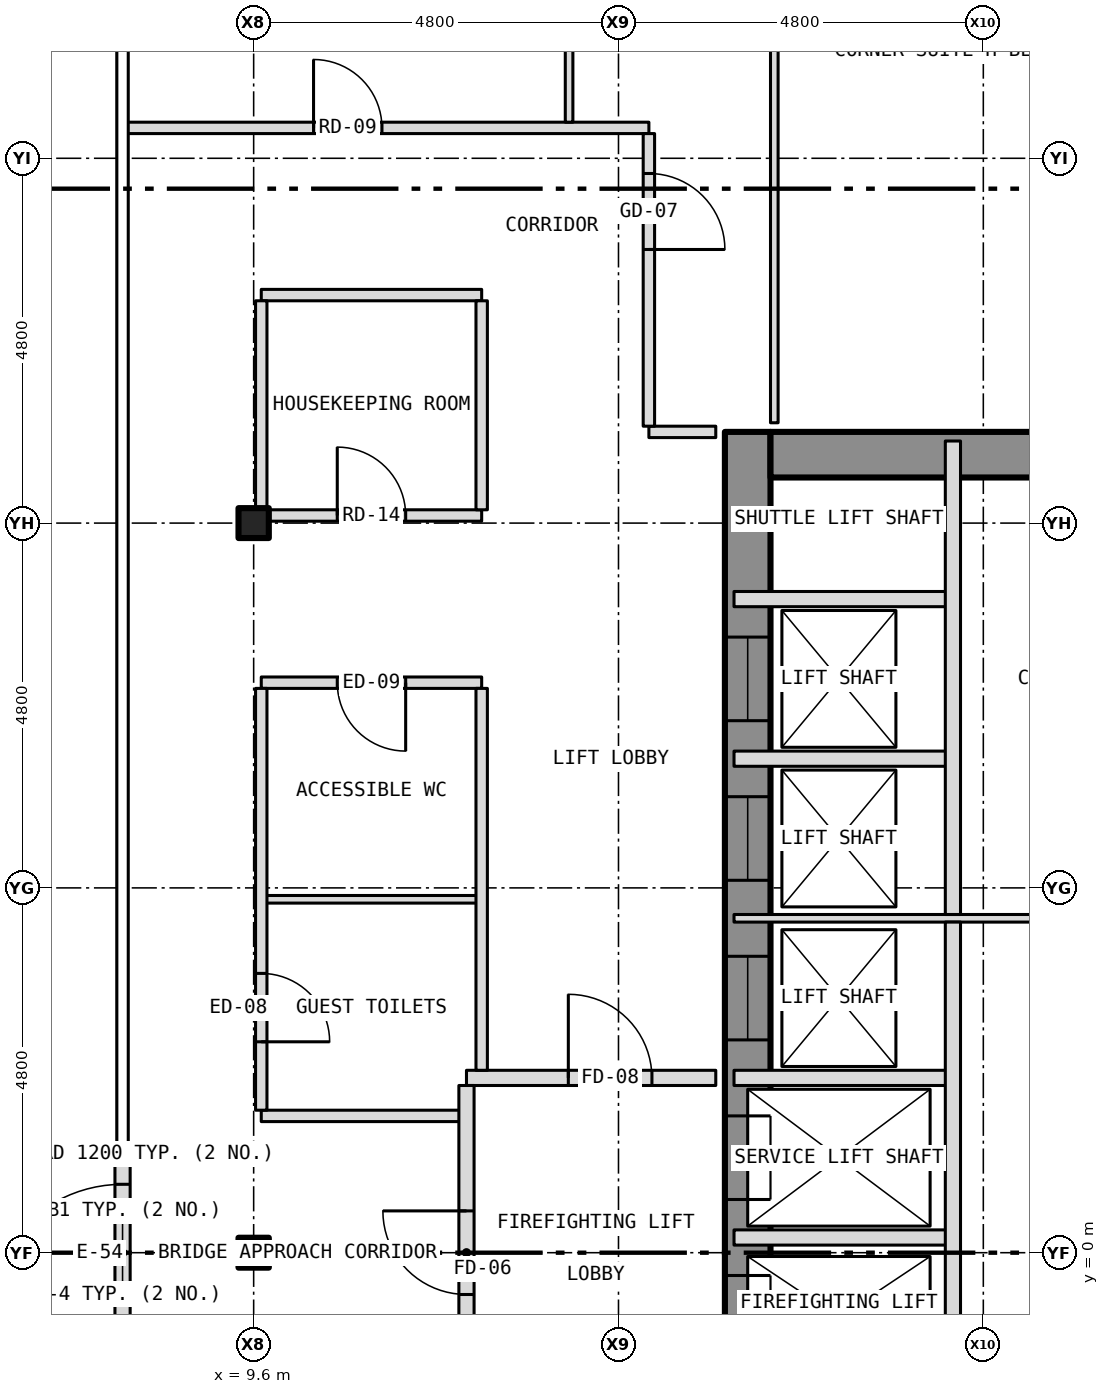
"""IFC4 building model, lengths in metres.
Left out: names, types, materials, properties, quantities, classifications, styles, units other than length and angle.
Written with IfcOpenShell. Run it as: python <this file> out.ifc"""

import sys

from ifc_helpers import new_model, si_unit, direction, frame, frame_2d, origin, origin_2d, place, context, subcontext, project, spatial, rectangle, i_section, extrude, element, fill, save


model = new_model("IFC4")
c1 = context("Model", 3, precision=1e-05, world=origin(), true_north=direction((0.0, 1.0)))
c2 = subcontext(c1, "Body", "Model", "MODEL_VIEW")
j1 = project(units=[si_unit("LENGTHUNIT", "METRE"), si_unit("PLANEANGLEUNIT", "RADIAN")], contexts=[c1])
p1 = place(None, origin())
s1 = spatial("IfcSite", under=j1, at=p1, CompositionType="ELEMENT")
p2 = place(p1, origin())
s2 = spatial("IfcBuilding", under=s1, at=p2, CompositionType="ELEMENT")
p3 = place(p2, frame((0.0, 0.0, 134.5)))
s3 = spatial("IfcBuildingStorey", under=s2, at=p3, CompositionType="ELEMENT", Elevation=134.5)
for number, where, z_axis, x_axis in (
    (1, (9.6, 0.0, -0.15), (0.0, 0.0, 1.0), (1.0, 0.0, 0.0)),
    (2, (9.6, 9.6, -0.15), (0.0, 0.0, 1.0), (1.0, 0.0, 0.0)),
):
    element("IfcColumn", number, at=place(p3, frame(where, z_axis=z_axis, x_axis=x_axis)), inside=s3, PredefinedType="COLUMN", context=c2, shape_type="SweptSolid", body=[
        extrude(i_section(OverallWidth=0.399, OverallDepth=0.394, WebThickness=0.023, FlangeThickness=0.037, at=origin_2d()), origin(), (0.0, 0.0, 1.0), 3.35),
    ])
p4 = place(p3, frame((16.1, -10.8, 0.0), z_axis=(0.0, 0.0, 1.0), x_axis=(0.0, 1.0, 0.0)))
e3 = element("IfcWall", 3, at=p4, inside=s3, PredefinedType="SHEAR", context=c2, shape_type="SweptSolid", body=[
    extrude(rectangle(XDim=21.6, YDim=0.6, at=frame_2d((10.8, 0.0))), origin(), (0.0, 0.0, 1.0), 2.9),
])
p5 = place(p4, frame((9.4, 0.0, 0.0)))
e4 = element("IfcOpeningElement", 4, at=p5, cuts=e3, PredefinedType="OPENING", context=c2, shape_type="SweptSolid", body=[
    extrude(rectangle(XDim=1.1, YDim=2.1, at=frame_2d((0.55, 1.05))), frame((0.0, 0.312, 0.0), z_axis=(0.0, -1.0, 0.0), x_axis=(1.0, 0.0, 0.0)), (0.0, 0.0, 1.0), 0.624),
])
p6 = place(p4, frame((11.5, 0.0, 0.0)))
e5 = element("IfcOpeningElement", 5, at=p6, cuts=e3, PredefinedType="OPENING", context=c2, shape_type="SweptSolid", body=[
    extrude(rectangle(XDim=1.1, YDim=2.1, at=frame_2d((0.55, 1.05))), frame((0.0, 0.312, 0.0), z_axis=(0.0, -1.0, 0.0), x_axis=(1.0, 0.0, 0.0)), (0.0, 0.0, 1.0), 0.624),
])
p7 = place(p4, frame((13.6, 0.0, 0.0)))
e6 = element("IfcOpeningElement", 6, at=p7, cuts=e3, PredefinedType="OPENING", context=c2, shape_type="SweptSolid", body=[
    extrude(rectangle(XDim=1.1, YDim=2.1, at=frame_2d((0.55, 1.05))), frame((0.0, 0.312, 0.0), z_axis=(0.0, -1.0, 0.0), x_axis=(1.0, 0.0, 0.0)), (0.0, 0.0, 1.0), 0.624),
])
p8 = place(p4, frame((15.7, 0.0, 0.0)))
e7 = element("IfcOpeningElement", 7, at=p8, cuts=e3, PredefinedType="OPENING", context=c2, shape_type="SweptSolid", body=[
    extrude(rectangle(XDim=1.1, YDim=2.1, at=frame_2d((0.55, 1.05))), frame((0.0, 0.312, 0.0), z_axis=(0.0, -1.0, 0.0), x_axis=(1.0, 0.0, 0.0)), (0.0, 0.0, 1.0), 0.624),
])
p9 = place(p4, frame((17.8, 0.0, 0.0)))
e8 = element("IfcOpeningElement", 8, at=p9, cuts=e3, PredefinedType="OPENING", context=c2, shape_type="SweptSolid", body=[
    extrude(rectangle(XDim=1.1, YDim=2.1, at=frame_2d((0.55, 1.05))), frame((0.0, 0.312, 0.0), z_axis=(0.0, -1.0, 0.0), x_axis=(1.0, 0.0, 0.0)), (0.0, 0.0, 1.0), 0.624),
])
p10 = place(p4, frame((5.642, 0.0, 0.0)))
e9 = element("IfcOpeningElement", 9, at=p10, cuts=e3, PredefinedType="OPENING", context=c2, shape_type="SweptSolid", body=[
    extrude(rectangle(XDim=1.1, YDim=2.1, at=frame_2d((0.55, 1.05))), frame((0.0, 0.312, 0.0), z_axis=(0.0, -1.0, 0.0), x_axis=(1.0, 0.0, 0.0)), (0.0, 0.0, 1.0), 0.624),
])
p11 = place(p4, frame((7.5, 0.0, 0.0)))
e10 = element("IfcOpeningElement", 10, at=p11, cuts=e3, PredefinedType="OPENING", context=c2, shape_type="SweptSolid", body=[
    extrude(rectangle(XDim=1.1, YDim=2.1, at=frame_2d((0.55, 1.05))), frame((0.0, 0.312, 0.0), z_axis=(0.0, -1.0, 0.0), x_axis=(1.0, 0.0, 0.0)), (0.0, 0.0, 1.0), 0.624),
])
p12 = place(p3, frame((16.4, 10.5, 0.0), z_axis=(0.0, 0.0, 1.0), x_axis=(1.0, 0.0, 0.0)))
e11 = element("IfcWall", 11, at=p12, inside=s3, PredefinedType="SHEAR", context=c2, shape_type="SweptSolid", body=[
    extrude(rectangle(XDim=5.8, YDim=0.6, at=frame_2d((2.9, 0.0))), origin(), (0.0, 0.0, 1.0), 2.9),
])
p13 = place(p3, frame((7.875, -1.4, 0.0), z_axis=(0.0, 0.0, 1.0), x_axis=(0.0, 1.0, 0.0)))
e12 = element("IfcWall", 12, at=p13, inside=s3, PredefinedType="SOLIDWALL", context=c2, shape_type="SweptSolid", body=[
    extrude(rectangle(XDim=2.8, YDim=0.2, at=frame_2d((1.4, 0.0))), origin(), (0.0, 0.0, 1.0), 3.5),
])
p14 = place(p13, frame((0.5, 0.0, 0.0)))
e13 = element("IfcOpeningElement", 13, at=p14, cuts=e12, PredefinedType="OPENING", context=c2, shape_type="SweptSolid", body=[
    extrude(rectangle(XDim=1.8, YDim=2.1, at=frame_2d((0.9, 1.05))), frame((0.0, 0.112, 0.0), z_axis=(0.0, -1.0, 0.0), x_axis=(1.0, 0.0, 0.0)), (0.0, 0.0, 1.0), 0.224),
])
p15 = place(p3, frame((15.92, 0.2, 0.0), z_axis=(0.0, 0.0, 1.0), x_axis=(1.0, 0.0, 0.0)))
e14 = element("IfcWall", 14, at=p15, inside=s3, PredefinedType="PARTITIONING", context=c2, shape_type="SweptSolid", body=[
    extrude(rectangle(XDim=2.88, YDim=0.2, at=frame_2d((1.44, 0.0))), origin(), (0.0, 0.0, 1.0), 2.9),
])
p16 = place(p3, frame((9.7, 1.8, 0.0), z_axis=(0.0, 0.0, 1.0), x_axis=(1.0, 0.0, 0.0)))
e15 = element("IfcWall", 15, at=p16, inside=s3, PredefinedType="PARTITIONING", context=c2, shape_type="SweptSolid", body=[
    extrude(rectangle(XDim=2.7, YDim=0.15, at=frame_2d((1.35, 0.0))), origin(), (0.0, 0.0, 1.0), 3.2),
])
p17 = place(p3, frame((12.4, 2.3, 0.0), z_axis=(0.0, 0.0, 1.0), x_axis=(1.0, 0.0, 0.0)))
e16 = element("IfcWall", 16, at=p17, inside=s3, PredefinedType="PARTITIONING", context=c2, shape_type="SweptSolid", body=[
    extrude(rectangle(XDim=3.28, YDim=0.2, at=frame_2d((1.64, 0.0))), origin(), (0.0, 0.0, 1.0), 3.2),
])
p18 = place(p17, frame((1.34, 0.0, 0.0)))
e17 = element("IfcOpeningElement", 17, at=p18, cuts=e16, PredefinedType="OPENING", context=c2, shape_type="SweptSolid", body=[
    extrude(rectangle(XDim=1.1, YDim=2.1, at=frame_2d((0.55, 1.05))), frame((0.0, 0.112, 0.0), z_axis=(0.0, -1.0, 0.0), x_axis=(1.0, 0.0, 0.0)), (0.0, 0.0, 1.0), 0.224),
])
p19 = place(p3, frame((15.92, 2.3, 0.0), z_axis=(0.0, 0.0, 1.0), x_axis=(1.0, 0.0, 0.0)))
e18 = element("IfcWall", 18, at=p19, inside=s3, PredefinedType="PARTITIONING", context=c2, shape_type="SweptSolid", body=[
    extrude(rectangle(XDim=2.88, YDim=0.2, at=frame_2d((1.44, 0.0))), origin(), (0.0, 0.0, 1.0), 2.9),
])
p20 = place(p3, frame((15.92, 4.4, 0.0), z_axis=(0.0, 0.0, 1.0), x_axis=(1.0, 0.0, 0.0)))
e19 = element("IfcWall", 19, at=p20, inside=s3, PredefinedType="PARTITIONING", context=c2, shape_type="SweptSolid", body=[
    extrude(rectangle(XDim=6.76, YDim=0.1, at=frame_2d((3.38, 0.0))), origin(), (0.0, 0.0, 1.0), 2.9),
])
p21 = place(p20, frame((4.43, 0.0, 0.0)))
e20 = element("IfcOpeningElement", 20, at=p21, cuts=e19, PredefinedType="OPENING", context=c2, shape_type="SweptSolid", body=[
    extrude(rectangle(XDim=0.9, YDim=2.1, at=frame_2d((0.45, 1.05))), frame((0.0, 0.062, 0.0), z_axis=(0.0, -1.0, 0.0), x_axis=(1.0, 0.0, 0.0)), (0.0, 0.0, 1.0), 0.124),
])
p22 = place(p3, frame((9.7, 4.65, 0.0), z_axis=(0.0, 0.0, 1.0), x_axis=(1.0, 0.0, 0.0)))
e21 = element("IfcWall", 21, at=p22, inside=s3, PredefinedType="PARTITIONING", context=c2, shape_type="SweptSolid", body=[
    extrude(rectangle(XDim=2.9, YDim=0.1, at=frame_2d((1.45, 0.0))), origin(), (0.0, 0.0, 1.0), 3.2),
])
p23 = place(p3, frame((15.92, 6.5, 0.0), z_axis=(0.0, 0.0, 1.0), x_axis=(1.0, 0.0, 0.0)))
e22 = element("IfcWall", 22, at=p23, inside=s3, PredefinedType="PARTITIONING", context=c2, shape_type="SweptSolid", body=[
    extrude(rectangle(XDim=2.88, YDim=0.2, at=frame_2d((1.44, 0.0))), origin(), (0.0, 0.0, 1.0), 2.9),
])
p24 = place(p3, frame((9.7, 7.5, 0.0), z_axis=(0.0, 0.0, 1.0), x_axis=(1.0, 0.0, 0.0)))
e23 = element("IfcWall", 23, at=p24, inside=s3, PredefinedType="PARTITIONING", context=c2, shape_type="SweptSolid", body=[
    extrude(rectangle(XDim=2.9, YDim=0.15, at=frame_2d((1.45, 0.0))), origin(), (0.0, 0.0, 1.0), 3.2),
])
p25 = place(p24, frame((1.0, 0.0, 0.0)))
e24 = element("IfcOpeningElement", 24, at=p25, cuts=e23, PredefinedType="OPENING", context=c2, shape_type="SweptSolid", body=[
    extrude(rectangle(XDim=0.9, YDim=2.1, at=frame_2d((0.45, 1.05))), frame((0.0, 0.087, 0.0), z_axis=(0.0, -1.0, 0.0), x_axis=(1.0, 0.0, 0.0)), (0.0, 0.0, 1.0), 0.174),
])
p26 = place(p3, frame((15.92, 8.6, 0.0), z_axis=(0.0, 0.0, 1.0), x_axis=(1.0, 0.0, 0.0)))
e25 = element("IfcWall", 25, at=p26, inside=s3, PredefinedType="PARTITIONING", context=c2, shape_type="SweptSolid", body=[
    extrude(rectangle(XDim=2.88, YDim=0.2, at=frame_2d((1.44, 0.0))), origin(), (0.0, 0.0, 1.0), 2.9),
])
p27 = place(p3, frame((9.7, 9.7, 0.0), z_axis=(0.0, 0.0, 1.0), x_axis=(1.0, 0.0, 0.0)))
e26 = element("IfcWall", 26, at=p27, inside=s3, PredefinedType="PARTITIONING", context=c2, shape_type="SweptSolid", body=[
    extrude(rectangle(XDim=2.9, YDim=0.15, at=frame_2d((1.45, 0.0))), origin(), (0.0, 0.0, 1.0), 2.578),
])
p28 = place(p27, frame((1.0, 0.0, 0.0)))
e27 = element("IfcOpeningElement", 27, at=p28, cuts=e26, PredefinedType="OPENING", context=c2, shape_type="SweptSolid", body=[
    extrude(rectangle(XDim=0.9, YDim=2.1, at=frame_2d((0.45, 1.05))), frame((0.0, 0.087, 0.0), z_axis=(0.0, -1.0, 0.0), x_axis=(1.0, 0.0, 0.0)), (0.0, 0.0, 1.0), 0.174),
])
p29 = place(p3, frame((14.8, 10.8, 0.0), z_axis=(0.0, 0.0, 1.0), x_axis=(1.0, 0.0, 0.0)))
e28 = element("IfcWall", 28, at=p29, inside=s3, PredefinedType="PARTITIONING", context=c2, shape_type="SweptSolid", body=[
    extrude(rectangle(XDim=0.88, YDim=0.15, at=frame_2d((0.44, 0.0))), origin(), (0.0, 0.0, 1.0), 3.2),
])
p30 = place(p3, frame((9.7, 12.6, 0.0), z_axis=(0.0, 0.0, 1.0), x_axis=(1.0, 0.0, 0.0)))
e29 = element("IfcWall", 29, at=p30, inside=s3, PredefinedType="PARTITIONING", context=c2, shape_type="SweptSolid", body=[
    extrude(rectangle(XDim=2.9, YDim=0.15, at=frame_2d((1.45, 0.0))), origin(), (0.0, 0.0, 1.0), 3.2),
])
p31 = place(p3, frame((7.92, 14.8, 0.0), z_axis=(0.0, 0.0, 1.0), x_axis=(1.0, 0.0, 0.0)))
e30 = element("IfcWall", 30, at=p31, inside=s3, PredefinedType="PARTITIONING", context=c2, shape_type="SweptSolid", body=[
    extrude(rectangle(XDim=6.88, YDim=0.15, at=frame_2d((3.44, 0.0))), origin(), (0.0, 0.0, 1.0), 3.2),
])
p32 = place(p31, frame((2.468, 0.0, 0.0)))
e31 = element("IfcOpeningElement", 31, at=p32, cuts=e30, PredefinedType="OPENING", context=c2, shape_type="SweptSolid", body=[
    extrude(rectangle(XDim=0.9, YDim=2.1, at=frame_2d((0.45, 1.05))), frame((0.0, 0.087, 0.0), z_axis=(0.0, -1.0, 0.0), x_axis=(1.0, 0.0, 0.0)), (0.0, 0.0, 1.0), 0.174),
])
p33 = place(p3, frame((9.7, 1.875, 0.0), z_axis=(0.0, 0.0, 1.0), x_axis=(0.0, 1.0, 0.0)))
e32 = element("IfcWall", 32, at=p33, inside=s3, PredefinedType="PARTITIONING", context=c2, shape_type="SweptSolid", body=[
    extrude(rectangle(XDim=5.55, YDim=0.15, at=frame_2d((2.775, 0.0))), origin(), (0.0, 0.0, 1.0), 2.578),
])
p34 = place(p33, frame((0.9, 0.0, 0.0)))
e33 = element("IfcOpeningElement", 33, at=p34, cuts=e32, PredefinedType="OPENING", context=c2, shape_type="SweptSolid", body=[
    extrude(rectangle(XDim=0.9, YDim=2.1, at=frame_2d((0.45, 1.05))), frame((0.0, 0.087, 0.0), z_axis=(0.0, -1.0, 0.0), x_axis=(1.0, 0.0, 0.0)), (0.0, 0.0, 1.0), 0.174),
])
p35 = place(p3, frame((9.7, 9.775, 0.0), z_axis=(0.0, 0.0, 1.0), x_axis=(0.0, 1.0, 0.0)))
e34 = element("IfcWall", 34, at=p35, inside=s3, PredefinedType="PARTITIONING", context=c2, shape_type="SweptSolid", body=[
    extrude(rectangle(XDim=2.75, YDim=0.15, at=frame_2d((1.375, 0.0))), origin(), (0.0, 0.0, 1.0), 2.578),
])
p36 = place(p3, frame((12.4, -1.8, 0.0), z_axis=(0.0, 0.0, 1.0), x_axis=(0.0, 1.0, 0.0)))
e35 = element("IfcWall", 35, at=p36, inside=s3, PredefinedType="PARTITIONING", context=c2, shape_type="SweptSolid", body=[
    extrude(rectangle(XDim=4.0, YDim=0.2, at=frame_2d((2.0, 0.0))), origin(), (0.0, 0.0, 1.0), 3.2),
])
p37 = place(p36, frame((1.25, 0.0, 0.0)))
e36 = element("IfcOpeningElement", 36, at=p37, cuts=e35, PredefinedType="OPENING", context=c2, shape_type="SweptSolid", body=[
    extrude(rectangle(XDim=1.1, YDim=2.1, at=frame_2d((0.55, 1.05))), frame((0.0, 0.112, 0.0), z_axis=(0.0, -1.0, 0.0), x_axis=(1.0, 0.0, 0.0)), (0.0, 0.0, 1.0), 0.224),
])
p38 = place(p3, frame((12.6, 2.4, 0.0), z_axis=(0.0, 0.0, 1.0), x_axis=(0.0, 1.0, 0.0)))
e37 = element("IfcWall", 37, at=p38, inside=s3, PredefinedType="PARTITIONING", context=c2, shape_type="SweptSolid", body=[
    extrude(rectangle(XDim=5.025, YDim=0.15, at=frame_2d((2.513, 0.0))), origin(), (0.0, 0.0, 1.0), 3.2),
])
p39 = place(p3, frame((12.6, 9.775, 0.0), z_axis=(0.0, 0.0, 1.0), x_axis=(0.0, 1.0, 0.0)))
e38 = element("IfcWall", 38, at=p39, inside=s3, PredefinedType="PARTITIONING", context=c2, shape_type="SweptSolid", body=[
    extrude(rectangle(XDim=2.75, YDim=0.15, at=frame_2d((1.375, 0.0))), origin(), (0.0, 0.0, 1.0), 3.2),
])
p40 = place(p3, frame((13.75, 14.875, 0.0), z_axis=(0.0, 0.0, 1.0), x_axis=(0.0, 1.0, 0.0)))
e39 = element("IfcWall", 39, at=p40, inside=s3, PredefinedType="PARTITIONING", context=c2, shape_type="SweptSolid", body=[
    extrude(rectangle(XDim=7.805, YDim=0.1, at=frame_2d((3.902, 0.0))), origin(), (0.0, 0.0, 1.0), 3.2),
])
p41 = place(p3, frame((14.8, 10.875, 0.0), z_axis=(0.0, 0.0, 1.0), x_axis=(0.0, 1.0, 0.0)))
e40 = element("IfcWall", 40, at=p41, inside=s3, PredefinedType="PARTITIONING", context=c2, shape_type="SweptSolid", body=[
    extrude(rectangle(XDim=3.85, YDim=0.15, at=frame_2d((1.925, 0.0))), origin(), (0.0, 0.0, 1.0), 3.2),
])
p42 = place(p41, frame((2.325, 0.0, 0.0)))
e41 = element("IfcOpeningElement", 41, at=p42, cuts=e40, PredefinedType="OPENING", context=c2, shape_type="SweptSolid", body=[
    extrude(rectangle(XDim=1.0, YDim=2.1, at=frame_2d((0.5, 1.05))), frame((0.0, 0.087, 0.0), z_axis=(0.0, -1.0, 0.0), x_axis=(1.0, 0.0, 0.0)), (0.0, 0.0, 1.0), 0.174),
])
p43 = place(p3, frame((16.45, 10.92, 0.0), z_axis=(0.0, 0.0, 1.0), x_axis=(0.0, 1.0, 0.0)))
e42 = element("IfcWall", 42, at=p43, inside=s3, PredefinedType="PARTITIONING", context=c2, shape_type="SweptSolid", body=[
    extrude(rectangle(XDim=12.36, YDim=0.1, at=frame_2d((6.18, 0.0))), origin(), (0.0, 0.0, 1.0), 3.2),
])
p44 = place(p43, frame((5.43, 0.0, 0.0)))
e43 = element("IfcOpeningElement", 43, at=p44, cuts=e42, PredefinedType="OPENING", context=c2, shape_type="SweptSolid", body=[
    extrude(rectangle(XDim=0.9, YDim=2.1, at=frame_2d((0.45, 1.05))), frame((0.0, 0.062, 0.0), z_axis=(0.0, -1.0, 0.0), x_axis=(1.0, 0.0, 0.0)), (0.0, 0.0, 1.0), 0.124),
])
p45 = place(p3, frame((18.8, -1.8, 0.0), z_axis=(0.0, 0.0, 1.0), x_axis=(0.0, 1.0, 0.0)))
e44 = element("IfcWall", 44, at=p45, inside=s3, PredefinedType="PARTITIONING", context=c2, shape_type="SweptSolid", body=[
    extrude(rectangle(XDim=6.15, YDim=0.2, at=frame_2d((3.075, 0.0))), origin(), (0.0, 0.0, 1.0), 2.9),
])
p46 = place(p3, frame((18.8, 4.45, 0.0), z_axis=(0.0, 0.0, 1.0), x_axis=(0.0, 1.0, 0.0)))
e45 = element("IfcWall", 45, at=p46, inside=s3, PredefinedType="PARTITIONING", context=c2, shape_type="SweptSolid", body=[
    extrude(rectangle(XDim=6.23, YDim=0.2, at=frame_2d((3.115, 0.0))), origin(), (0.0, 0.0, 1.0), 2.9),
])
p47 = place(p14, origin())
e46 = element("IfcDoor", 46, at=p47, inside=s3, OperationType="DOUBLE_DOOR_DOUBLE_SWING", PredefinedType="DOOR", context=c2, shape_type="SweptSolid", body=[
    extrude(rectangle(XDim=1.8, YDim=2.1, at=frame_2d((0.9, 1.05))), frame((0.0, 0.025, 0.0), z_axis=(0.0, -1.0, 0.0), x_axis=(1.0, 0.0, 0.0)), (0.0, 0.0, 1.0), 0.05),
])
fill(e13, e46)
p48 = place(p5, origin())
e47 = element("IfcDoor", 47, at=p48, inside=s3, OperationType="SLIDING_TO_LEFT", PredefinedType="DOOR", context=c2, shape_type="SweptSolid", body=[
    extrude(rectangle(XDim=1.1, YDim=2.1, at=frame_2d((0.55, 1.05))), frame((0.0, 0.025, 0.0), z_axis=(0.0, -1.0, 0.0), x_axis=(1.0, 0.0, 0.0)), (0.0, 0.0, 1.0), 0.05),
])
fill(e4, e47)
p49 = place(p6, origin())
e48 = element("IfcDoor", 48, at=p49, inside=s3, OperationType="SLIDING_TO_LEFT", PredefinedType="DOOR", context=c2, shape_type="SweptSolid", body=[
    extrude(rectangle(XDim=1.1, YDim=2.1, at=frame_2d((0.55, 1.05))), frame((0.0, 0.025, 0.0), z_axis=(0.0, -1.0, 0.0), x_axis=(1.0, 0.0, 0.0)), (0.0, 0.0, 1.0), 0.05),
])
fill(e5, e48)
p50 = place(p7, origin())
e49 = element("IfcDoor", 49, at=p50, inside=s3, OperationType="SLIDING_TO_LEFT", PredefinedType="DOOR", context=c2, shape_type="SweptSolid", body=[
    extrude(rectangle(XDim=1.1, YDim=2.1, at=frame_2d((0.55, 1.05))), frame((0.0, 0.025, 0.0), z_axis=(0.0, -1.0, 0.0), x_axis=(1.0, 0.0, 0.0)), (0.0, 0.0, 1.0), 0.05),
])
fill(e6, e49)
p51 = place(p8, origin())
e50 = element("IfcDoor", 50, at=p51, inside=s3, OperationType="SLIDING_TO_LEFT", PredefinedType="DOOR", context=c2, shape_type="SweptSolid", body=[
    extrude(rectangle(XDim=1.1, YDim=2.1, at=frame_2d((0.55, 1.05))), frame((0.0, 0.025, 0.0), z_axis=(0.0, -1.0, 0.0), x_axis=(1.0, 0.0, 0.0)), (0.0, 0.0, 1.0), 0.05),
])
fill(e7, e50)
p52 = place(p9, origin())
e51 = element("IfcDoor", 51, at=p52, inside=s3, OperationType="SLIDING_TO_LEFT", PredefinedType="DOOR", context=c2, shape_type="SweptSolid", body=[
    extrude(rectangle(XDim=1.1, YDim=2.1, at=frame_2d((0.55, 1.05))), frame((0.0, 0.025, 0.0), z_axis=(0.0, -1.0, 0.0), x_axis=(1.0, 0.0, 0.0)), (0.0, 0.0, 1.0), 0.05),
])
fill(e8, e51)
p53 = place(p37, origin())
e52 = element("IfcDoor", 52, at=p53, inside=s3, OperationType="SINGLE_SWING_RIGHT", PredefinedType="DOOR", context=c2, shape_type="SweptSolid", body=[
    extrude(rectangle(XDim=1.1, YDim=2.1, at=frame_2d((0.55, 1.05))), frame((0.0, 0.025, 0.0), z_axis=(0.0, -1.0, 0.0), x_axis=(1.0, 0.0, 0.0)), (0.0, 0.0, 1.0), 0.05),
])
fill(e36, e52)
p54 = place(p18, origin())
e53 = element("IfcDoor", 53, at=p54, inside=s3, OperationType="SINGLE_SWING_LEFT", PredefinedType="DOOR", context=c2, shape_type="SweptSolid", body=[
    extrude(rectangle(XDim=1.1, YDim=2.1, at=frame_2d((0.55, 1.05))), frame((0.0, 0.025, 0.0), z_axis=(0.0, -1.0, 0.0), x_axis=(1.0, 0.0, 0.0)), (0.0, 0.0, 1.0), 0.05),
])
fill(e17, e53)
p55 = place(p32, origin())
e54 = element("IfcDoor", 54, at=p55, inside=s3, OperationType="SINGLE_SWING_LEFT", PredefinedType="DOOR", context=c2, shape_type="SweptSolid", body=[
    extrude(rectangle(XDim=0.9, YDim=2.1, at=frame_2d((0.45, 1.05))), frame((0.0, 0.025, 0.0), z_axis=(0.0, -1.0, 0.0), x_axis=(1.0, 0.0, 0.0)), (0.0, 0.0, 1.0), 0.05),
])
fill(e31, e54)
p56 = place(p42, origin())
e55 = element("IfcDoor", 55, at=p56, inside=s3, OperationType="SINGLE_SWING_LEFT", PredefinedType="DOOR", context=c2, shape_type="SweptSolid", body=[
    extrude(rectangle(XDim=1.0, YDim=2.1, at=frame_2d((0.5, 1.05))), frame((0.0, 0.025, 0.0), z_axis=(0.0, -1.0, 0.0), x_axis=(1.0, 0.0, 0.0)), (0.0, 0.0, 1.0), 0.05),
])
fill(e41, e55)
p57 = place(p28, origin())
e56 = element("IfcDoor", 56, at=p57, inside=s3, OperationType="SINGLE_SWING_LEFT", PredefinedType="DOOR", context=c2, shape_type="SweptSolid", body=[
    extrude(rectangle(XDim=0.9, YDim=2.1, at=frame_2d((0.45, 1.05))), frame((0.0, 0.025, 0.0), z_axis=(0.0, -1.0, 0.0), x_axis=(1.0, 0.0, 0.0)), (0.0, 0.0, 1.0), 0.05),
])
fill(e27, e56)
p58 = place(p34, origin())
e57 = element("IfcDoor", 57, at=p58, inside=s3, OperationType="SINGLE_SWING_LEFT", PredefinedType="DOOR", context=c2, shape_type="SweptSolid", body=[
    extrude(rectangle(XDim=0.9, YDim=2.1, at=frame_2d((0.45, 1.05))), frame((0.0, 0.025, 0.0), z_axis=(0.0, -1.0, 0.0), x_axis=(1.0, 0.0, 0.0)), (0.0, 0.0, 1.0), 0.05),
])
fill(e33, e57)
p59 = place(p25, origin())
e58 = element("IfcDoor", 58, at=p59, inside=s3, OperationType="SINGLE_SWING_RIGHT", PredefinedType="DOOR", context=c2, shape_type="SweptSolid", body=[
    extrude(rectangle(XDim=0.9, YDim=2.1, at=frame_2d((0.45, 1.05))), frame((0.0, 0.025, 0.0), z_axis=(0.0, -1.0, 0.0), x_axis=(1.0, 0.0, 0.0)), (0.0, 0.0, 1.0), 0.05),
])
fill(e24, e58)
save(model, sys.argv[1])
